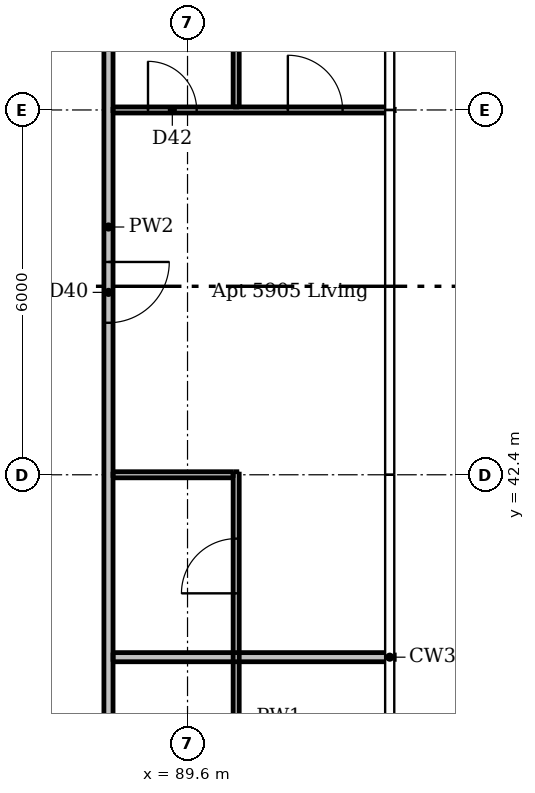
"""IFC4 building model, lengths in metres.
Left out: names, types, materials, properties, quantities, classifications, styles, units other than length and angle.
Written with IfcOpenShell. Run it as: python <this file> out.ifc"""

import sys

from ifc_helpers import new_model, si_unit, direction, frame, frame_2d, origin, place, context, subcontext, project, spatial, rectangle, extrude, element, fill, save


model = new_model("IFC4")
c1 = context("Model", 3, precision=1e-05, world=origin(), true_north=direction((0.0, 1.0)))
c2 = subcontext(c1, "Body", "Model", "MODEL_VIEW")
j1 = project(units=[si_unit("LENGTHUNIT", "METRE"), si_unit("PLANEANGLEUNIT", "RADIAN")], contexts=[c1])
p1 = place(None, origin())
s1 = spatial("IfcSite", under=j1, at=p1, CompositionType="ELEMENT")
p2 = place(p1, origin())
s2 = spatial("IfcBuilding", under=s1, at=p2, CompositionType="ELEMENT")
p3 = place(p2, frame((0.0, 0.0, 220.0)))
s3 = spatial("IfcBuildingStorey", under=s2, at=p3, CompositionType="ELEMENT", Elevation=220.0)
p4 = place(p3, frame((90.4, 33.45, 0.0), z_axis=(0.0, 0.0, 1.0), x_axis=(0.0, 1.0, 0.0)))
e1 = element("IfcWall", 1, at=p4, inside=s3, PredefinedType="PARTITIONING", context=c2, shape_type="SweptSolid", body=[
    extrude(rectangle(XDim=9.0, YDim=0.1, at=frame_2d((4.5, 0.0))), origin(), (0.0, 0.0, 1.0), 3.05),
])
p5 = place(p4, frame((3.75, 0.0, 0.0)))
e2 = element("IfcOpeningElement", 2, at=p5, cuts=e1, PredefinedType="OPENING", context=c2, shape_type="SweptSolid", body=[
    extrude(rectangle(XDim=0.8, YDim=2.1, at=frame_2d((0.4, 1.05))), frame((0.0, 0.06, 0.0), z_axis=(0.0, -1.0, 0.0), x_axis=(1.0, 0.0, 0.0)), (0.0, 0.0, 1.0), 0.12),
])
p6 = place(p4, frame((7.0, 0.0, 0.0)))
e3 = element("IfcOpeningElement", 3, at=p6, cuts=e1, PredefinedType="OPENING", context=c2, shape_type="SweptSolid", body=[
    extrude(rectangle(XDim=0.9, YDim=2.1, at=frame_2d((0.45, 1.05))), frame((0.0, 0.06, 0.0), z_axis=(0.0, -1.0, 0.0), x_axis=(1.0, 0.0, 0.0)), (0.0, 0.0, 1.0), 0.12),
])
p7 = place(p3, frame((90.4, 48.45, 0.0), z_axis=(0.0, 0.0, 1.0), x_axis=(0.0, 1.0, 0.0)))
e4 = element("IfcWall", 4, at=p7, inside=s3, PredefinedType="PARTITIONING", context=c2, shape_type="SweptSolid", body=[
    extrude(rectangle(XDim=5.4, YDim=0.1, at=frame_2d((2.7, 0.0))), origin(), (0.0, 0.0, 1.0), 3.05),
])
p8 = place(p7, frame((3.7, 0.0, 0.0)))
e5 = element("IfcOpeningElement", 5, at=p8, cuts=e4, PredefinedType="OPENING", context=c2, shape_type="SweptSolid", body=[
    extrude(rectangle(XDim=0.9, YDim=2.1, at=frame_2d((0.45, 1.05))), frame((0.0, 0.06, 0.0), z_axis=(0.0, -1.0, 0.0), x_axis=(1.0, 0.0, 0.0)), (0.0, 0.0, 1.0), 0.12),
])
p9 = place(p3, frame((88.375, 48.4, 0.0), z_axis=(0.0, 0.0, 1.0), x_axis=(1.0, 0.0, 0.0)))
e6 = element("IfcWall", 6, at=p9, inside=s3, PredefinedType="PARTITIONING", context=c2, shape_type="SweptSolid", body=[
    extrude(rectangle(XDim=4.625, YDim=0.1, at=frame_2d((2.312, 0.0))), origin(), (0.0, 0.0, 1.0), 2.516),
])
p10 = place(p9, frame((2.875, 0.0, 0.0)))
e7 = element("IfcOpeningElement", 7, at=p10, cuts=e6, PredefinedType="OPENING", context=c2, shape_type="SweptSolid", body=[
    extrude(rectangle(XDim=0.9, YDim=2.1, at=frame_2d((0.45, 1.05))), frame((0.0, 0.06, 0.0), z_axis=(0.0, -1.0, 0.0), x_axis=(1.0, 0.0, 0.0)), (0.0, 0.0, 1.0), 0.12),
])
p11 = place(p9, frame((0.575, 0.0, 0.0)))
e8 = element("IfcOpeningElement", 8, at=p11, cuts=e6, PredefinedType="OPENING", context=c2, shape_type="SweptSolid", body=[
    extrude(rectangle(XDim=0.8, YDim=2.1, at=frame_2d((0.4, 1.05))), frame((0.0, 0.06, 0.0), z_axis=(0.0, -1.0, 0.0), x_axis=(1.0, 0.0, 0.0)), (0.0, 0.0, 1.0), 0.12),
])
p12 = place(p3, frame((88.375, 42.4, 0.0), z_axis=(0.0, 0.0, 1.0), x_axis=(1.0, 0.0, 0.0)))
e9 = element("IfcWall", 9, at=p12, inside=s3, PredefinedType="PARTITIONING", context=c2, shape_type="SweptSolid", body=[
    extrude(rectangle(XDim=1.975, YDim=0.1, at=frame_2d((0.988, 0.0))), origin(), (0.0, 0.0, 1.0), 2.59),
])
p13 = place(p3, frame((88.3, 61.175, 0.0), z_axis=(0.0, 0.0, 1.0), x_axis=(0.0, -1.0, 0.0)))
e10 = element("IfcWall", 10, at=p13, inside=s3, PredefinedType="PARTITIONING", context=c2, shape_type="SweptSolid", body=[
    extrude(rectangle(XDim=29.4, YDim=0.15, at=frame_2d((14.7, 0.0))), origin(), (0.0, 0.0, 1.0), 3.05),
])
p14 = place(p13, frame((28.125, 0.0, 0.0)))
e11 = element("IfcOpeningElement", 11, at=p14, cuts=e10, PredefinedType="OPENING", context=c2, shape_type="SweptSolid", body=[
    extrude(rectangle(XDim=1.0, YDim=2.1, at=frame_2d((0.5, 1.05))), frame((0.0, 0.085, 0.0), z_axis=(0.0, -1.0, 0.0), x_axis=(1.0, 0.0, 0.0)), (0.0, 0.0, 1.0), 0.17),
])
p15 = place(p13, frame((15.275, 0.0, 0.0)))
e12 = element("IfcOpeningElement", 12, at=p15, cuts=e10, PredefinedType="OPENING", context=c2, shape_type="SweptSolid", body=[
    extrude(rectangle(XDim=1.0, YDim=2.1, at=frame_2d((0.5, 1.05))), frame((0.0, 0.085, 0.0), z_axis=(0.0, -1.0, 0.0), x_axis=(1.0, 0.0, 0.0)), (0.0, 0.0, 1.0), 0.17),
])
p16 = place(p13, frame((5.075, 0.0, 0.0)))
e13 = element("IfcOpeningElement", 13, at=p16, cuts=e10, PredefinedType="OPENING", context=c2, shape_type="SweptSolid", body=[
    extrude(rectangle(XDim=1.0, YDim=2.1, at=frame_2d((0.5, 1.05))), frame((0.0, 0.085, 0.0), z_axis=(0.0, -1.0, 0.0), x_axis=(1.0, 0.0, 0.0)), (0.0, 0.0, 1.0), 0.17),
])
p17 = place(p3, frame((88.375, 39.4, 0.0), z_axis=(0.0, 0.0, 1.0), x_axis=(1.0, 0.0, 0.0)))
e14 = element("IfcWall", 14, at=p17, inside=s3, PredefinedType="PARTITIONING", context=c2, shape_type="SweptSolid", body=[
    extrude(rectangle(XDim=4.625, YDim=0.15, at=frame_2d((2.312, 0.0))), origin(), (0.0, 0.0, 1.0), 3.05),
])
p18 = place(p15, origin())
e15 = element("IfcDoor", 15, at=p18, inside=s3, OperationType="SINGLE_SWING_LEFT", PredefinedType="DOOR", context=c2, shape_type="SweptSolid", body=[
    extrude(rectangle(XDim=1.0, YDim=2.1, at=frame_2d((0.5, 1.05))), frame((0.0, 0.025, 0.0), z_axis=(0.0, -1.0, 0.0), x_axis=(1.0, 0.0, 0.0)), (0.0, 0.0, 1.0), 0.05),
])
fill(e12, e15)
p19 = place(p6, origin())
e16 = element("IfcDoor", 16, at=p19, inside=s3, OperationType="SINGLE_SWING_LEFT", PredefinedType="DOOR", context=c2, shape_type="SweptSolid", body=[
    extrude(rectangle(XDim=0.9, YDim=2.1, at=frame_2d((0.45, 1.05))), frame((0.0, 0.025, 0.0), z_axis=(0.0, -1.0, 0.0), x_axis=(1.0, 0.0, 0.0)), (0.0, 0.0, 1.0), 0.05),
])
fill(e3, e16)
p20 = place(p10, origin())
e17 = element("IfcDoor", 17, at=p20, inside=s3, OperationType="SINGLE_SWING_LEFT", PredefinedType="DOOR", context=c2, shape_type="SweptSolid", body=[
    extrude(rectangle(XDim=0.9, YDim=2.1, at=frame_2d((0.45, 1.05))), frame((0.0, 0.025, 0.0), z_axis=(0.0, -1.0, 0.0), x_axis=(1.0, 0.0, 0.0)), (0.0, 0.0, 1.0), 0.05),
])
fill(e7, e17)
p21 = place(p11, origin())
e18 = element("IfcDoor", 18, at=p21, inside=s3, OperationType="SINGLE_SWING_LEFT", PredefinedType="DOOR", context=c2, shape_type="SweptSolid", body=[
    extrude(rectangle(XDim=0.8, YDim=2.1, at=frame_2d((0.4, 1.05))), frame((0.0, 0.025, 0.0), z_axis=(0.0, -1.0, 0.0), x_axis=(1.0, 0.0, 0.0)), (0.0, 0.0, 1.0), 0.05),
])
fill(e8, e18)
save(model, sys.argv[1])
